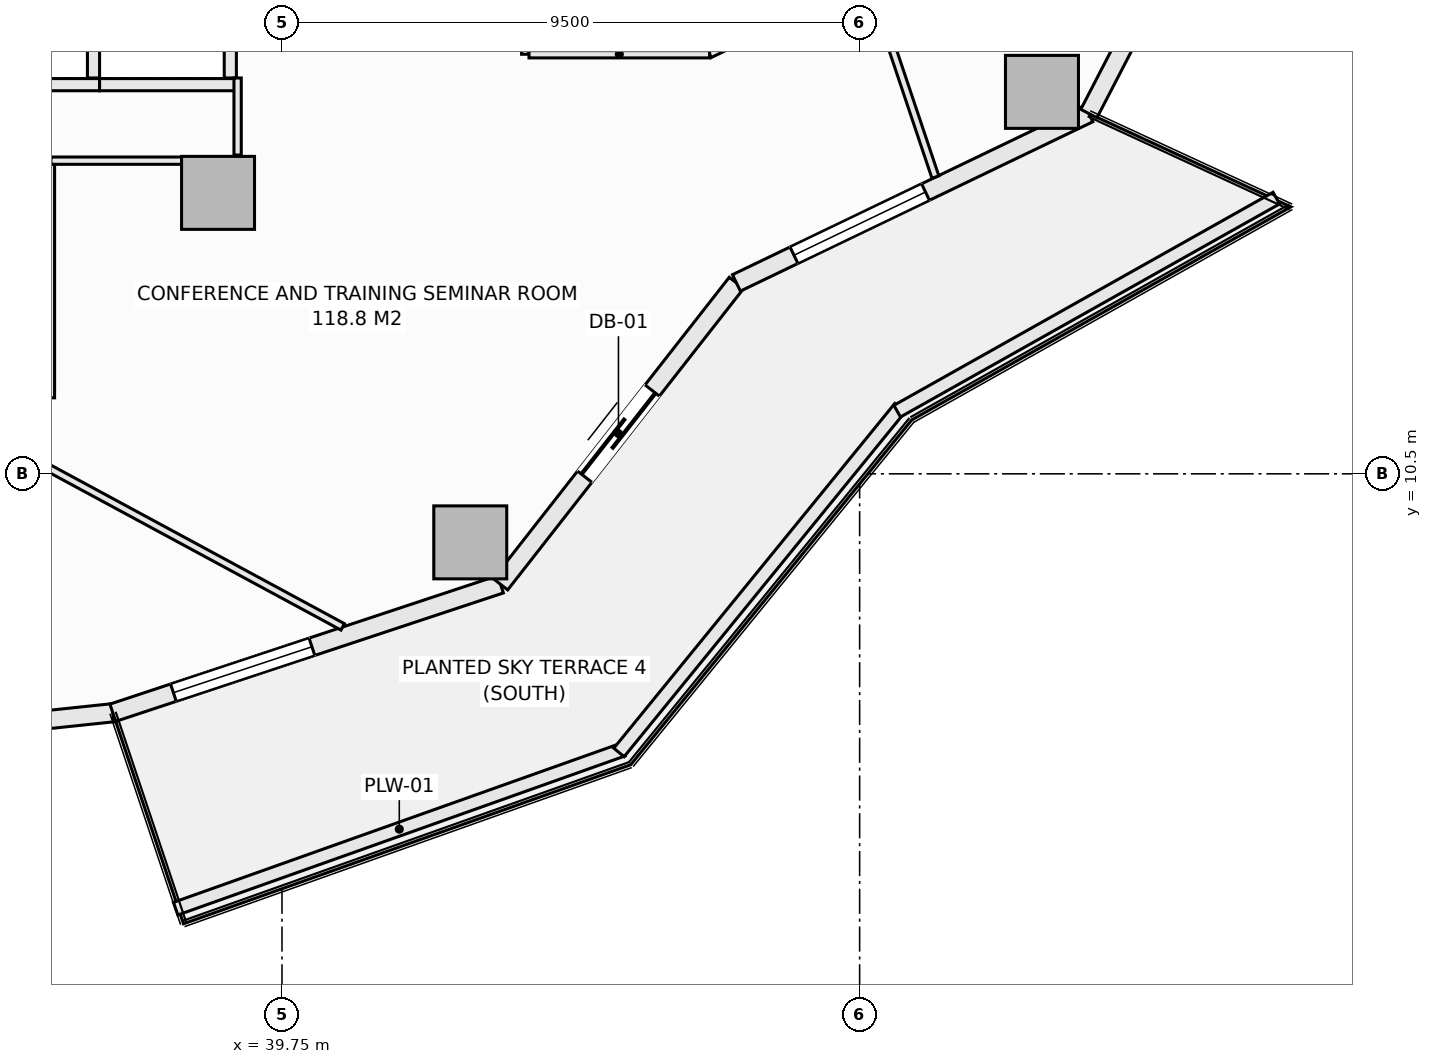
"""IFC4 building model, lengths in metres.
Left out: names, types, materials, properties, quantities, classifications, styles, units other than length and angle.
Written with IfcOpenShell. Run it as: python <this file> out.ifc"""

import sys

from ifc_helpers import new_model, si_unit, direction, frame, frame_2d, origin, origin_2d, place, context, subcontext, project, spatial, rectangle, extrude, element, fill, save


model = new_model("IFC4")
c1 = context("Model", 3, precision=1e-05, world=origin(), true_north=direction((0.0, 1.0)))
c2 = subcontext(c1, "Body", "Model", "MODEL_VIEW")
j1 = project(units=[si_unit("LENGTHUNIT", "METRE"), si_unit("PLANEANGLEUNIT", "RADIAN")], contexts=[c1])
p1 = place(None, origin())
s1 = spatial("IfcSite", under=j1, at=p1, CompositionType="ELEMENT")
p2 = place(p1, origin())
s2 = spatial("IfcBuilding", under=s1, at=p2, CompositionType="ELEMENT")
p3 = place(p2, frame((0.0, 0.0, 88.1)))
s3 = spatial("IfcBuildingStorey", under=s2, at=p3, CompositionType="ELEMENT", Elevation=88.1)
for number, where, z_axis, x_axis in (
    (1, (42.846, 9.373, -0.28), (0.0, 0.0, 1.0), (1.0, 0.0, 0.0)),
    (2, (52.249, 16.781, -0.28), (0.0, 0.0, 1.0), (1.0, 0.0, 0.0)),
    (3, (38.698, 15.121, -0.28), (0.0, 0.0, 1.0), (1.0, 0.0, 0.0)),
):
    element("IfcColumn", number, at=place(p3, frame(where, z_axis=z_axis, x_axis=x_axis)), inside=s3, PredefinedType="COLUMN", context=c2, shape_type="SweptSolid", body=[
        extrude(rectangle(XDim=1.2, YDim=1.2, at=origin_2d()), origin(), (0.0, 0.0, 1.0), 3.85),
    ])
p4 = place(p3, frame((30.125, 5.85, 0.0), z_axis=(0.0, 0.0, 1.0), x_axis=(0.994498840295, 0.104747585419, 0.0)))
e4 = element("IfcWall", 4, at=p4, inside=s3, PredefinedType="SOLIDWALL", context=c2, shape_type="SweptSolid", body=[
    extrude(rectangle(XDim=6.88, YDim=0.3, at=frame_2d((3.44, 0.0))), origin(), (0.0, 0.0, 1.0), 3.093),
])
p5 = place(p4, frame((2.24, 0.0, 0.85)))
e5 = element("IfcOpeningElement", 5, at=p5, cuts=e4, PredefinedType="OPENING", context=c2, shape_type="SweptSolid", body=[
    extrude(rectangle(XDim=2.4, YDim=1.9, at=frame_2d((1.2, 0.95))), frame((0.0, 0.16, 0.0), z_axis=(0.0, -1.0, 0.0), x_axis=(1.0, 0.0, 0.0)), (0.0, 0.0, 1.0), 0.32),
])
p6 = place(p3, frame((36.968, 6.571, 0.0), z_axis=(0.0, 0.0, 1.0), x_axis=(0.949245153629, 0.314537181127, 0.0)))
e6 = element("IfcWall", 6, at=p6, inside=s3, PredefinedType="SOLIDWALL", context=c2, shape_type="SweptSolid", body=[
    extrude(rectangle(XDim=6.717, YDim=0.3, at=frame_2d((3.358, 0.0))), origin(), (0.0, 0.0, 1.0), 3.093),
])
p7 = place(p6, frame((1.05, 0.0, 0.85)))
e7 = element("IfcOpeningElement", 7, at=p7, cuts=e6, PredefinedType="OPENING", context=c2, shape_type="SweptSolid", body=[
    extrude(rectangle(XDim=2.4, YDim=1.9, at=frame_2d((1.2, 0.95))), frame((0.0, 0.16, 0.0), z_axis=(0.0, -1.0, 0.0), x_axis=(1.0, 0.0, 0.0)), (0.0, 0.0, 1.0), 0.32),
])
p8 = place(p3, frame((43.344, 8.684, 0.0), z_axis=(0.0, 0.0, 1.0), x_axis=(0.616434798832, 0.78740595552, 0.0)))
e8 = element("IfcWall", 8, at=p8, inside=s3, PredefinedType="SOLIDWALL", context=c2, shape_type="SweptSolid", body=[
    extrude(rectangle(XDim=6.294, YDim=0.3, at=frame_2d((3.147, 0.0))), origin(), (0.0, 0.0, 1.0), 3.093),
])
p9 = place(p8, frame((2.247, 0.0, 0.0)))
e9 = element("IfcOpeningElement", 9, at=p9, cuts=e8, PredefinedType="OPENING", context=c2, shape_type="SweptSolid", body=[
    extrude(rectangle(XDim=1.8, YDim=2.25, at=frame_2d((0.9, 1.125))), frame((0.0, 0.16, 0.0), z_axis=(0.0, -1.0, 0.0), x_axis=(1.0, 0.0, 0.0)), (0.0, 0.0, 1.0), 0.32),
])
p10 = place(p3, frame((47.224, 13.64, 0.0), z_axis=(0.0, 0.0, 1.0), x_axis=(0.901354747727, 0.433081538224, 0.0)))
e10 = element("IfcWall", 10, at=p10, inside=s3, PredefinedType="SOLIDWALL", context=c2, shape_type="SweptSolid", body=[
    extrude(rectangle(XDim=6.431, YDim=0.3, at=frame_2d((3.215, 0.0))), origin(), (0.0, 0.0, 1.0), 3.093),
])
p11 = place(p10, frame((1.05, 0.0, 0.85)))
e11 = element("IfcOpeningElement", 11, at=p11, cuts=e10, PredefinedType="OPENING", context=c2, shape_type="SweptSolid", body=[
    extrude(rectangle(XDim=2.4, YDim=1.9, at=frame_2d((1.2, 0.95))), frame((0.0, 0.16, 0.0), z_axis=(0.0, -1.0, 0.0), x_axis=(1.0, 0.0, 0.0)), (0.0, 0.0, 1.0), 0.32),
])
p12 = place(p3, frame((53.021, 16.425, 0.0), z_axis=(0.0, 0.0, 1.0), x_axis=(0.459800981414, 0.888021991558, 0.0)))
e12 = element("IfcWall", 12, at=p12, inside=s3, PredefinedType="SOLIDWALL", context=c2, shape_type="SweptSolid", body=[
    extrude(rectangle(XDim=5.744, YDim=0.3, at=frame_2d((2.872, 0.0))), origin(), (0.0, 0.0, 1.0), 3.093),
])
p13 = place(p12, frame((1.672, 0.0, 0.85)))
e13 = element("IfcOpeningElement", 13, at=p13, cuts=e12, PredefinedType="OPENING", context=c2, shape_type="SweptSolid", body=[
    extrude(rectangle(XDim=2.4, YDim=1.9, at=frame_2d((1.2, 0.95))), frame((0.0, 0.16, 0.0), z_axis=(0.0, -1.0, 0.0), x_axis=(1.0, 0.0, 0.0)), (0.0, 0.0, 1.0), 0.32),
])
p14 = place(p3, frame((38.001, 3.349, 0.0), z_axis=(0.0, 0.0, 1.0), x_axis=(0.942203722205, 0.335040513764, 0.0)))
e14 = element("IfcWall", 14, at=p14, inside=s3, PredefinedType="PARAPET", context=c2, shape_type="SweptSolid", body=[
    extrude(rectangle(XDim=7.807, YDim=0.22, at=frame_2d((3.904, 0.0))), origin(), (0.0, 0.0, 1.0), 0.52),
])
p15 = place(p3, frame((45.292, 5.918, 0.0), z_axis=(0.0, 0.0, 1.0), x_axis=(0.631819273026, 0.775115737315, 0.0)))
e15 = element("IfcWall", 15, at=p15, inside=s3, PredefinedType="PARAPET", context=c2, shape_type="SweptSolid", body=[
    extrude(rectangle(XDim=7.316, YDim=0.22, at=frame_2d((3.658, 0.0))), origin(), (0.0, 0.0, 1.0), 0.52),
])
p16 = place(p3, frame((49.868, 11.531, 0.0), z_axis=(0.0, 0.0, 1.0), x_axis=(0.871775109335, 0.489906275468, 0.0)))
e16 = element("IfcWall", 16, at=p16, inside=s3, PredefinedType="PARAPET", context=c2, shape_type="SweptSolid", body=[
    extrude(rectangle(XDim=7.152, YDim=0.22, at=frame_2d((3.576, 0.0))), origin(), (0.0, 0.0, 1.0), 0.52),
])
p17 = place(p3, frame((34.5, 16.9, 0.0), z_axis=(0.0, 0.0, 1.0), x_axis=(1.0, 0.0, 0.0)))
e17 = element("IfcWall", 17, at=p17, inside=s3, PredefinedType="SOLIDWALL", context=c2, shape_type="SweptSolid", body=[
    extrude(rectangle(XDim=2.25, YDim=0.2, at=frame_2d((1.125, 0.0))), origin(), (0.0, 0.0, 1.0), 3.57),
])
p18 = place(p3, frame((36.65, 17.01, 0.0), z_axis=(0.0, 0.0, 1.0), x_axis=(0.0, 1.0, 0.0)))
e18 = element("IfcWall", 18, at=p18, inside=s3, PredefinedType="SOLIDWALL", context=c2, shape_type="SweptSolid", body=[
    extrude(rectangle(XDim=2.43, YDim=0.2, at=frame_2d((1.215, 0.0))), origin(), (0.0, 0.0, 1.0), 3.57),
])
p19 = place(p3, frame((36.75, 16.9, 0.0), z_axis=(0.0, 0.0, 1.0), x_axis=(1.0, 0.0, 0.0)))
e19 = element("IfcWall", 19, at=p19, inside=s3, PredefinedType="SOLIDWALL", context=c2, shape_type="SweptSolid", body=[
    extrude(rectangle(XDim=2.25, YDim=0.2, at=frame_2d((1.125, 0.0))), origin(), (0.0, 0.0, 1.0), 3.57),
])
p20 = place(p3, frame((38.9, 17.01, 0.0), z_axis=(0.0, 0.0, 1.0), x_axis=(0.0, 1.0, 0.0)))
e20 = element("IfcWall", 20, at=p20, inside=s3, PredefinedType="SOLIDWALL", context=c2, shape_type="SweptSolid", body=[
    extrude(rectangle(XDim=2.43, YDim=0.2, at=frame_2d((1.215, 0.0))), origin(), (0.0, 0.0, 1.0), 3.57),
])
p21 = place(p3, frame((35.95, 15.65, 0.0), z_axis=(0.0, 0.0, 1.0), x_axis=(1.0, 0.0, 0.0)))
e21 = element("IfcWall", 21, at=p21, inside=s3, PredefinedType="PARTITIONING", context=c2, shape_type="SweptSolid", body=[
    extrude(rectangle(XDim=2.291, YDim=0.12, at=frame_2d((1.146, 0.0))), origin(), (0.0, 0.0, 1.0), 3.57),
])
p22 = place(p3, frame((35.95, 11.75, 0.0), z_axis=(0.0, 0.0, 1.0), x_axis=(0.0, 1.0, 0.0)))
e22 = element("IfcWall", 22, at=p22, inside=s3, PredefinedType="PARTITIONING", context=c2, shape_type="SweptSolid", body=[
    extrude(rectangle(XDim=3.838, YDim=0.12, at=frame_2d((1.919, 0.0))), origin(), (0.0, 0.0, 1.0), 3.57),
])
p23 = place(p3, frame((43.75, 17.4, 0.0), z_axis=(0.0, 0.0, 1.0), x_axis=(0.0, 1.0, 0.0)))
e23 = element("IfcWall", 23, at=p23, inside=s3, PredefinedType="PARTITIONING", context=c2, shape_type="SweptSolid", body=[
    extrude(rectangle(XDim=5.62, YDim=0.12, at=frame_2d((2.81, 0.0))), origin(), (0.0, 0.0, 1.0), 3.57),
])
p24 = place(p23, frame((2.125, 0.0, 0.0)))
e24 = element("IfcOpeningElement", 24, at=p24, cuts=e23, PredefinedType="OPENING", context=c2, shape_type="SweptSolid", body=[
    extrude(rectangle(XDim=0.95, YDim=2.1, at=frame_2d((0.475, 1.05))), frame((0.0, 0.07, 0.0), z_axis=(0.0, -1.0, 0.0), x_axis=(1.0, 0.0, 0.0)), (0.0, 0.0, 1.0), 0.14),
])
p25 = place(p3, frame((46.783, 17.4, 0.0), z_axis=(0.0, 0.0, 1.0), x_axis=(0.901339159108, 0.433113980679, 0.0)))
e25 = element("IfcWall", 25, at=p25, inside=s3, PredefinedType="PARTITIONING", context=c2, shape_type="SweptSolid", body=[
    extrude(rectangle(XDim=4.29, YDim=0.12, at=frame_2d((2.145, 0.0))), origin(), (0.0, 0.0, 1.0), 3.57),
])
p26 = place(p3, frame((43.812, 17.4, 0.0), z_axis=(0.0, 0.0, 1.0), x_axis=(1.0, 0.0, 0.0)))
e26 = element("IfcWall", 26, at=p26, inside=s3, PredefinedType="PARTITIONING", context=c2, shape_type="SweptSolid", body=[
    extrude(rectangle(XDim=2.971, YDim=0.12, at=frame_2d((1.485, 0.0))), origin(), (0.0, 0.0, 1.0), 3.57),
])
p27 = place(p3, frame((39.02, 15.742, 0.0), z_axis=(0.0, 0.0, 1.0), x_axis=(0.0, 1.0, 0.0)))
e27 = element("IfcWall", 27, at=p27, inside=s3, PredefinedType="PARTITIONING", context=c2, shape_type="SweptSolid", body=[
    extrude(rectangle(XDim=1.268, YDim=0.12, at=frame_2d((0.634, 0.0))), origin(), (0.0, 0.0, 1.0), 2.934),
])
p28 = place(p3, frame((33.889, 11.688, 0.0), z_axis=(0.0, 0.0, 1.0), x_axis=(0.879862970093, -0.475227475909, 0.0)))
e28 = element("IfcWall", 28, at=p28, inside=s3, PredefinedType="PARTITIONING", context=c2, shape_type="SweptSolid", body=[
    extrude(rectangle(XDim=7.795, YDim=0.12, at=frame_2d((3.898, 0.0))), origin(), (0.0, 0.0, 1.0), 3.57),
])
p29 = place(p3, frame((49.417, 18.597, 0.0), z_axis=(0.0, 0.0, 1.0), x_axis=(0.318105552227, -0.948055303051, 0.0)))
e29 = element("IfcWall", 29, at=p29, inside=s3, PredefinedType="PARTITIONING", context=c2, shape_type="SweptSolid", body=[
    extrude(rectangle(XDim=3.392, YDim=0.12, at=frame_2d((1.696, 0.0))), origin(), (0.0, 0.0, 1.0), 3.57),
])
p30 = place(p7, origin())
e30 = element("IfcWindow", 30, at=p30, inside=s3, PartitioningType="SINGLE_PANEL", PredefinedType="WINDOW", context=c2, shape_type="SweptSolid", body=[
    extrude(rectangle(XDim=2.4, YDim=1.9, at=frame_2d((1.2, 0.95))), frame((0.0, 0.03, 0.0), z_axis=(0.0, -1.0, 0.0), x_axis=(1.0, 0.0, 0.0)), (0.0, 0.0, 1.0), 0.06),
])
fill(e7, e30)
p31 = place(p9, frame((1.8, 0.0, 0.0), z_axis=(0.0, 0.0, 1.0), x_axis=(-1.0, 0.0, 0.0)))
e31 = element("IfcDoor", 31, at=p31, inside=s3, OperationType="SLIDING_TO_LEFT", PredefinedType="DOOR", context=c2, shape_type="SweptSolid", body=[
    extrude(rectangle(XDim=1.8, YDim=2.25, at=frame_2d((0.9, 1.125))), frame((0.0, 0.025, 0.0), z_axis=(0.0, -1.0, 0.0), x_axis=(1.0, 0.0, 0.0)), (0.0, 0.0, 1.0), 0.05),
])
fill(e9, e31)
p32 = place(p11, origin())
e32 = element("IfcWindow", 32, at=p32, inside=s3, PartitioningType="SINGLE_PANEL", PredefinedType="WINDOW", context=c2, shape_type="SweptSolid", body=[
    extrude(rectangle(XDim=2.4, YDim=1.9, at=frame_2d((1.2, 0.95))), frame((0.0, 0.03, 0.0), z_axis=(0.0, -1.0, 0.0), x_axis=(1.0, 0.0, 0.0)), (0.0, 0.0, 1.0), 0.06),
])
fill(e11, e32)
save(model, sys.argv[1])
